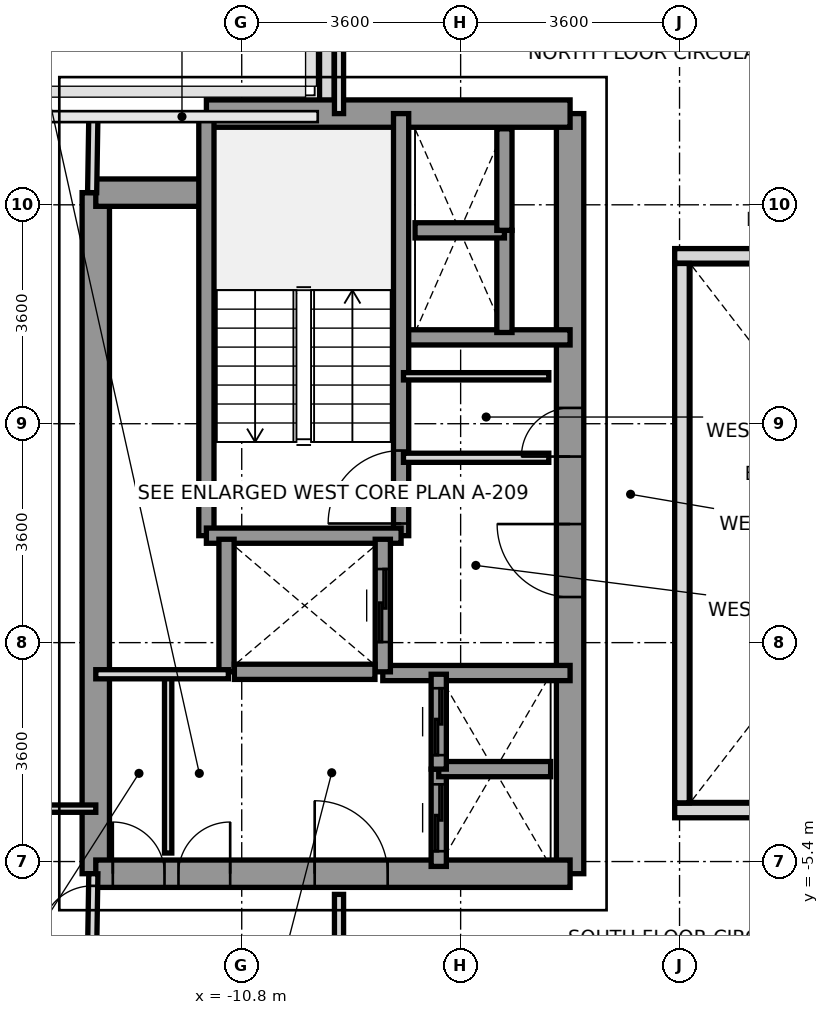
"""IFC4 building model, lengths in metres.
Left out: names, types, materials, properties, quantities, classifications, styles, units other than length and angle.
Written with IfcOpenShell. Run it as: python <this file> out.ifc"""

import sys

from ifc_helpers import new_model, si_unit, direction, frame, frame_2d, origin, place, context, subcontext, project, spatial, rectangle, extrude, source, transform, mapped, element, fill, save


model = new_model("IFC4")
c1 = context("Model", 3, precision=1e-05, world=origin(), true_north=direction((0.0, 1.0)))
c2 = subcontext(c1, "Body", "Model", "MODEL_VIEW")
j1 = project(units=[si_unit("LENGTHUNIT", "METRE"), si_unit("PLANEANGLEUNIT", "RADIAN")], contexts=[c1])
p1 = place(None, origin())
s1 = spatial("IfcSite", under=j1, at=p1, CompositionType="ELEMENT")
p2 = place(p1, origin())
s2 = spatial("IfcBuilding", under=s1, at=p2, CompositionType="ELEMENT")
p3 = place(p2, frame((0.0, 0.0, 121.0)))
s3 = spatial("IfcBuildingStorey", under=s2, at=p3, CompositionType="ELEMENT", Elevation=121.0)
p4 = place(p3, frame((-9.4, 6.953, 0.0), z_axis=(0.0, 0.0, 1.0), x_axis=(0.0, 1.0, 0.0)))
e1 = element("IfcWall", 1, at=p4, inside=s3, PredefinedType="PARAPET", context=c2, shape_type="SweptSolid", body=[
    extrude(rectangle(XDim=1.519, YDim=0.24, at=frame_2d((0.76, 0.0))), origin(), (0.0, 0.0, 1.0), 1.15),
])
p5 = place(p3, frame((-13.2, -5.6, 0.0), z_axis=(0.0, 0.0, 1.0), x_axis=(0.0, 1.0, 0.0)))
e2 = element("IfcWall", 2, at=p5, inside=s3, PredefinedType="SHEAR", context=c2, shape_type="SweptSolid", body=[
    extrude(rectangle(XDim=11.2, YDim=0.45, at=frame_2d((5.6, 0.0))), origin(), (0.0, 0.0, 1.0), 3.2),
])
p6 = place(p3, frame((-5.4, -5.6, 0.0), z_axis=(0.0, 0.0, 1.0), x_axis=(0.0, 1.0, 0.0)))
e3 = element("IfcWall", 3, at=p6, inside=s3, PredefinedType="SHEAR", context=c2, shape_type="SweptSolid", body=[
    extrude(rectangle(XDim=12.5, YDim=0.45, at=frame_2d((6.25, 0.0))), origin(), (0.0, 0.0, 1.0), 3.2),
])
p7 = place(p6, frame((4.55, 0.0, 0.0)))
e4 = element("IfcOpeningElement", 4, at=p7, cuts=e3, PredefinedType="OPENING", context=c2, shape_type="SweptSolid", body=[
    extrude(rectangle(XDim=1.2, YDim=2.2, at=frame_2d((0.6, 1.1))), frame((0.0, 0.235, 0.0), z_axis=(0.0, -1.0, 0.0), x_axis=(1.0, 0.0, 0.0)), (0.0, 0.0, 1.0), 0.47),
])
p8 = place(p6, frame((6.86, 0.0, 0.0)))
e5 = element("IfcOpeningElement", 5, at=p8, cuts=e3, PredefinedType="OPENING", context=c2, shape_type="SweptSolid", body=[
    extrude(rectangle(XDim=0.8, YDim=2.1, at=frame_2d((0.4, 1.05))), frame((0.0, 0.235, 0.0), z_axis=(0.0, -1.0, 0.0), x_axis=(1.0, 0.0, 0.0)), (0.0, 0.0, 1.0), 0.47),
])
p9 = place(p3, frame((-11.381, 6.9, 0.0), z_axis=(0.0, 0.0, 1.0), x_axis=(1.0, 0.0, 0.0)))
e6 = element("IfcWall", 6, at=p9, inside=s3, PredefinedType="SHEAR", context=c2, shape_type="SweptSolid", body=[
    extrude(rectangle(XDim=5.981, YDim=0.45, at=frame_2d((2.991, 0.0))), origin(), (0.0, 0.0, 1.0), 3.2),
])
p10 = place(p3, frame((-13.2, 5.6, 0.0), z_axis=(0.0, 0.0, 1.0), x_axis=(1.0, 0.0, 0.0)))
e7 = element("IfcWall", 7, at=p10, inside=s3, PredefinedType="SHEAR", context=c2, shape_type="SweptSolid", body=[
    extrude(rectangle(XDim=1.819, YDim=0.45, at=frame_2d((0.909, 0.0))), origin(), (0.0, 0.0, 1.0), 3.2),
])
p11 = place(p3, frame((-13.2, -5.6, 0.0), z_axis=(0.0, 0.0, 1.0), x_axis=(1.0, 0.0, 0.0)))
e8 = element("IfcWall", 8, at=p11, inside=s3, PredefinedType="SHEAR", context=c2, shape_type="SweptSolid", body=[
    extrude(rectangle(XDim=7.8, YDim=0.45, at=frame_2d((3.9, 0.0))), origin(), (0.0, 0.0, 1.0), 3.2),
])
p12 = place(p11, frame((3.6, 0.0, 0.0)))
e9 = element("IfcOpeningElement", 9, at=p12, cuts=e8, PredefinedType="OPENING", context=c2, shape_type="SweptSolid", body=[
    extrude(rectangle(XDim=1.2, YDim=2.2, at=frame_2d((0.6, 1.1))), frame((0.0, 0.235, 0.0), z_axis=(0.0, -1.0, 0.0), x_axis=(1.0, 0.0, 0.0)), (0.0, 0.0, 1.0), 0.47),
])
p13 = place(p11, frame((0.28, 0.0, 0.0)))
e10 = element("IfcOpeningElement", 10, at=p13, cuts=e8, PredefinedType="OPENING", context=c2, shape_type="SweptSolid", body=[
    extrude(rectangle(XDim=0.85, YDim=2.1, at=frame_2d((0.425, 1.05))), frame((0.0, 0.235, 0.0), z_axis=(0.0, -1.0, 0.0), x_axis=(1.0, 0.0, 0.0)), (0.0, 0.0, 1.0), 0.47),
])
p14 = place(p11, frame((1.36, 0.0, 0.0)))
e11 = element("IfcOpeningElement", 11, at=p14, cuts=e8, PredefinedType="OPENING", context=c2, shape_type="SweptSolid", body=[
    extrude(rectangle(XDim=0.85, YDim=2.1, at=frame_2d((0.425, 1.05))), frame((0.0, 0.235, 0.0), z_axis=(0.0, -1.0, 0.0), x_axis=(1.0, 0.0, 0.0)), (0.0, 0.0, 1.0), 0.47),
])
p15 = place(p3, frame((-8.18, 3.22, 0.0), z_axis=(0.0, 0.0, 1.0), x_axis=(1.0, 0.0, 0.0)))
e12 = element("IfcWall", 12, at=p15, inside=s3, PredefinedType="SOLIDWALL", context=c2, shape_type="SweptSolid", body=[
    extrude(rectangle(XDim=2.78, YDim=0.25, at=frame_2d((1.39, 0.0))), origin(), (0.0, 0.0, 1.0), 3.2),
])
p16 = place(p3, frame((-8.48, -2.3, 0.0), z_axis=(0.0, 0.0, 1.0), x_axis=(1.0, 0.0, 0.0)))
e13 = element("IfcWall", 13, at=p16, inside=s3, PredefinedType="SOLIDWALL", context=c2, shape_type="SweptSolid", body=[
    extrude(rectangle(XDim=3.08, YDim=0.25, at=frame_2d((1.54, 0.0))), origin(), (0.0, 0.0, 1.0), 3.2),
])
p17 = place(p3, frame((-8.179, -0.041, 0.0), z_axis=(0.0, 0.0, 1.0), x_axis=(0.0, 1.0, 0.0)))
e14 = element("IfcWall", 14, at=p17, inside=s3, PredefinedType="SOLIDWALL", context=c2, shape_type="SweptSolid", body=[
    extrude(rectangle(XDim=6.941, YDim=0.25, at=frame_2d((3.47, 0.0))), origin(), (0.0, 0.0, 1.0), 3.2),
])
p18 = place(p17, frame((0.2, 0.0, 0.0)))
e15 = element("IfcOpeningElement", 15, at=p18, cuts=e14, PredefinedType="OPENING", context=c2, shape_type="SweptSolid", body=[
    extrude(rectangle(XDim=1.2, YDim=2.2, at=frame_2d((0.6, 1.1))), frame((0.0, 0.135, 0.0), z_axis=(0.0, -1.0, 0.0), x_axis=(1.0, 0.0, 0.0)), (0.0, 0.0, 1.0), 0.27),
])
p19 = place(p3, frame((-11.381, -0.041, 0.0), z_axis=(0.0, 0.0, 1.0), x_axis=(0.0, 1.0, 0.0)))
e16 = element("IfcWall", 16, at=p19, inside=s3, PredefinedType="SOLIDWALL", context=c2, shape_type="SweptSolid", body=[
    extrude(rectangle(XDim=6.941, YDim=0.25, at=frame_2d((3.47, 0.0))), origin(), (0.0, 0.0, 1.0), 3.2),
])
p20 = place(p3, frame((-11.381, -0.041, 0.0), z_axis=(0.0, 0.0, 1.0), x_axis=(1.0, 0.0, 0.0)))
e17 = element("IfcWall", 17, at=p20, inside=s3, PredefinedType="SOLIDWALL", context=c2, shape_type="SweptSolid", body=[
    extrude(rectangle(XDim=3.202, YDim=0.25, at=frame_2d((1.601, 0.0))), origin(), (0.0, 0.0, 1.0), 3.2),
])
p21 = place(p3, frame((-11.05, -2.28, 0.0), z_axis=(0.0, 0.0, 1.0), x_axis=(0.0, 1.0, 0.0)))
e18 = element("IfcWall", 18, at=p21, inside=s3, PredefinedType="SOLIDWALL", context=c2, shape_type="SweptSolid", body=[
    extrude(rectangle(XDim=2.18, YDim=0.25, at=frame_2d((1.09, 0.0))), origin(), (0.0, 0.0, 1.0), 3.2),
])
p22 = place(p3, frame((-8.48, -2.28, 0.0), z_axis=(0.0, 0.0, 1.0), x_axis=(0.0, 1.0, 0.0)))
e19 = element("IfcWall", 19, at=p22, inside=s3, PredefinedType="SOLIDWALL", context=c2, shape_type="SweptSolid", body=[
    extrude(rectangle(XDim=2.18, YDim=0.25, at=frame_2d((1.09, 0.0))), origin(), (0.0, 0.0, 1.0), 3.2),
])
p23 = place(p22, frame((0.49, 0.0, 0.0)))
e20 = element("IfcOpeningElement", 20, at=p23, cuts=e19, PredefinedType="OPENING", context=c2, shape_type="SweptSolid", body=[
    extrude(rectangle(XDim=1.2, YDim=2.2, at=frame_2d((0.6, 1.1))), frame((0.0, 0.135, 0.0), z_axis=(0.0, -1.0, 0.0), x_axis=(1.0, 0.0, 0.0)), (0.0, 0.0, 1.0), 0.27),
])
p24 = place(p3, frame((-10.921, -2.28, 0.0), z_axis=(0.0, 0.0, 1.0), x_axis=(1.0, 0.0, 0.0)))
e21 = element("IfcWall", 21, at=p24, inside=s3, PredefinedType="SOLIDWALL", context=c2, shape_type="SweptSolid", body=[
    extrude(rectangle(XDim=2.312, YDim=0.25, at=frame_2d((1.156, 0.0))), origin(), (0.0, 0.0, 1.0), 3.2),
])
p25 = place(p3, frame((-7.56, -5.48, 0.0), z_axis=(0.0, 0.0, 1.0), x_axis=(0.0, 1.0, 0.0)))
e22 = element("IfcWall", 22, at=p25, inside=s3, PredefinedType="SOLIDWALL", context=c2, shape_type="SweptSolid", body=[
    extrude(rectangle(XDim=1.6, YDim=0.25, at=frame_2d((0.8, 0.0))), origin(), (0.0, 0.0, 1.0), 3.2),
])
p26 = place(p25, frame((0.25, 0.0, 0.0)))
e23 = element("IfcOpeningElement", 23, at=p26, cuts=e22, PredefinedType="OPENING", context=c2, shape_type="SweptSolid", body=[
    extrude(rectangle(XDim=1.1, YDim=2.2, at=frame_2d((0.55, 1.1))), frame((0.0, 0.135, 0.0), z_axis=(0.0, -1.0, 0.0), x_axis=(1.0, 0.0, 0.0)), (0.0, 0.0, 1.0), 0.27),
])
p27 = place(p3, frame((-7.56, -3.88, 0.0), z_axis=(0.0, 0.0, 1.0), x_axis=(1.0, 0.0, 0.0)))
e24 = element("IfcWall", 24, at=p27, inside=s3, PredefinedType="SOLIDWALL", context=c2, shape_type="SweptSolid", body=[
    extrude(rectangle(XDim=1.84, YDim=0.25, at=frame_2d((0.92, 0.0))), origin(), (0.0, 0.0, 1.0), 3.2),
])
p28 = place(p3, frame((-7.56, -3.88, 0.0), z_axis=(0.0, 0.0, 1.0), x_axis=(0.0, 1.0, 0.0)))
e25 = element("IfcWall", 25, at=p28, inside=s3, PredefinedType="SOLIDWALL", context=c2, shape_type="SweptSolid", body=[
    extrude(rectangle(XDim=1.56, YDim=0.25, at=frame_2d((0.78, 0.0))), origin(), (0.0, 0.0, 1.0), 3.2),
])
p29 = place(p28, frame((0.23, 0.0, 0.0)))
e26 = element("IfcOpeningElement", 26, at=p29, cuts=e25, PredefinedType="OPENING", context=c2, shape_type="SweptSolid", body=[
    extrude(rectangle(XDim=1.1, YDim=2.2, at=frame_2d((0.55, 1.1))), frame((0.0, 0.135, 0.0), z_axis=(0.0, -1.0, 0.0), x_axis=(1.0, 0.0, 0.0)), (0.0, 0.0, 1.0), 0.27),
])
p30 = place(p3, frame((-6.48, 3.3, 0.0), z_axis=(0.0, 0.0, 1.0), x_axis=(0.0, 1.0, 0.0)))
e27 = element("IfcWall", 27, at=p30, inside=s3, PredefinedType="SOLIDWALL", context=c2, shape_type="SweptSolid", body=[
    extrude(rectangle(XDim=1.68, YDim=0.25, at=frame_2d((0.84, 0.0))), origin(), (0.0, 0.0, 1.0), 3.2),
])
p31 = place(p3, frame((-7.95, 4.98, 0.0), z_axis=(0.0, 0.0, 1.0), x_axis=(1.0, 0.0, 0.0)))
e28 = element("IfcWall", 28, at=p31, inside=s3, PredefinedType="SOLIDWALL", context=c2, shape_type="SweptSolid", body=[
    extrude(rectangle(XDim=1.47, YDim=0.25, at=frame_2d((0.735, 0.0))), origin(), (0.0, 0.0, 1.0), 3.2),
])
p32 = place(p3, frame((-6.48, 4.98, 0.0), z_axis=(0.0, 0.0, 1.0), x_axis=(0.0, 1.0, 0.0)))
e29 = element("IfcWall", 29, at=p32, inside=s3, PredefinedType="SOLIDWALL", context=c2, shape_type="SweptSolid", body=[
    extrude(rectangle(XDim=1.67, YDim=0.25, at=frame_2d((0.835, 0.0))), origin(), (0.0, 0.0, 1.0), 3.2),
])
p33 = place(p3, frame((-8.14, 1.24, 0.0), z_axis=(0.0, 0.0, 1.0), x_axis=(1.0, 0.0, 0.0)))
e30 = element("IfcWall", 30, at=p33, inside=s3, PredefinedType="PARTITIONING", context=c2, shape_type="SweptSolid", body=[
    extrude(rectangle(XDim=2.39, YDim=0.15, at=frame_2d((1.195, 0.0))), origin(), (0.0, 0.0, 1.0), 2.3),
])
p34 = place(p3, frame((-8.14, 2.58, 0.0), z_axis=(0.0, 0.0, 1.0), x_axis=(1.0, 0.0, 0.0)))
e31 = element("IfcWall", 31, at=p34, inside=s3, PredefinedType="PARTITIONING", context=c2, shape_type="SweptSolid", body=[
    extrude(rectangle(XDim=2.39, YDim=0.12, at=frame_2d((1.195, 0.0))), origin(), (0.0, 0.0, 1.0), 2.3),
])
p35 = place(p3, frame((-12.01, -5.26, 0.0), z_axis=(0.0, 0.0, 1.0), x_axis=(0.0, 1.0, 0.0)))
e32 = element("IfcWall", 32, at=p35, inside=s3, PredefinedType="PARTITIONING", context=c2, shape_type="SweptSolid", body=[
    extrude(rectangle(XDim=2.94, YDim=0.12, at=frame_2d((1.47, 0.0))), origin(), (0.0, 0.0, 1.0), 3.2),
])
p36 = place(p3, frame((-13.2, -2.32, 0.0), z_axis=(0.0, 0.0, 1.0), x_axis=(1.0, 0.0, 0.0)))
e33 = element("IfcWall", 33, at=p36, inside=s3, PredefinedType="PARTITIONING", context=c2, shape_type="SweptSolid", body=[
    extrude(rectangle(XDim=2.18, YDim=0.15, at=frame_2d((1.09, 0.0))), origin(), (0.0, 0.0, 1.0), 3.2),
])
p37 = place(p3, frame((-9.2, 6.9, 0.0), z_axis=(0.0, 0.0, 1.0), x_axis=(0.0, 1.0, 0.0)))
e34 = element("IfcWall", 34, at=p37, inside=s3, PredefinedType="PARTITIONING", context=c2, shape_type="SweptSolid", body=[
    extrude(rectangle(XDim=8.78, YDim=0.15, at=frame_2d((4.39, 0.0))), origin(), (0.0, 0.0, 1.0), 2.7),
])
p38 = place(p3, frame((-9.2, -15.68, 0.0), z_axis=(0.0, 0.0, 1.0), x_axis=(0.0, 1.0, 0.0)))
e35 = element("IfcWall", 35, at=p38, inside=s3, PredefinedType="PARTITIONING", context=c2, shape_type="SweptSolid", body=[
    extrude(rectangle(XDim=9.74, YDim=0.15, at=frame_2d((4.87, 0.0))), origin(), (0.0, 0.0, 1.0), 2.7),
])
p39 = place(p3, frame((-13.26, 5.6, 0.0), z_axis=(0.0, 0.0, 1.0), x_axis=(0.016013571389, 0.999871774545, 0.0)))
e36 = element("IfcWall", 36, at=p39, inside=s3, PredefinedType="PARTITIONING", context=c2, shape_type="SweptSolid", body=[
    extrude(rectangle(XDim=1.25, YDim=0.15, at=frame_2d((0.625, 0.0))), origin(), (0.0, 0.0, 1.0), 3.2),
])
p40 = place(p3, frame((-13.26, -6.85, 0.0), z_axis=(0.0, 0.0, 1.0), x_axis=(0.016013571389, 0.999871774545, 0.0)))
e37 = element("IfcWall", 37, at=p40, inside=s3, PredefinedType="PARTITIONING", context=c2, shape_type="SweptSolid", body=[
    extrude(rectangle(XDim=1.25, YDim=0.15, at=frame_2d((0.625, 0.0))), origin(), (0.0, 0.0, 1.0), 3.2),
])
p41 = place(p40, frame((0.2, 0.0, 0.0)))
e38 = element("IfcOpeningElement", 38, at=p41, cuts=e37, PredefinedType="OPENING", context=c2, shape_type="SweptSolid", body=[
    extrude(rectangle(XDim=0.85, YDim=2.1, at=frame_2d((0.425, 1.05))), frame((0.0, 0.085, 0.0), z_axis=(0.0, -1.0, 0.0), x_axis=(1.0, 0.0, 0.0)), (0.0, 0.0, 1.0), 0.17),
])
p42 = place(p3, frame((-23.3, -4.53, 0.0), z_axis=(0.0, 0.0, 1.0), x_axis=(1.0, 0.0, 0.0)))
e39 = element("IfcWall", 39, at=p42, inside=s3, PredefinedType="PARTITIONING", context=c2, shape_type="SweptSolid", body=[
    extrude(rectangle(XDim=10.1, YDim=0.12, at=frame_2d((5.05, 0.0))), origin(), (0.0, 0.0, 1.0), 2.75),
])
p43 = place(p42, frame((1.4, 0.0, 0.0)))
e40 = element("IfcOpeningElement", 40, at=p43, cuts=e39, PredefinedType="OPENING", context=c2, shape_type="SweptSolid", body=[
    extrude(rectangle(XDim=0.95, YDim=2.15, at=frame_2d((0.475, 1.075))), frame((0.0, 0.07, 0.0), z_axis=(0.0, -1.0, 0.0), x_axis=(1.0, 0.0, 0.0)), (0.0, 0.0, 1.0), 0.14),
])
for number, where, z_axis, x_axis in (
    (41, (-3.68, -4.56, 0.0), (0.0, 0.0, 1.0), (1.0, 0.0, 0.0)),
    (42, (-3.68, 4.56, 0.0), (0.0, 0.0, 1.0), (1.0, 0.0, 0.0)),
):
    element("IfcWall", number, at=place(p3, frame(where, z_axis=z_axis, x_axis=x_axis)), inside=s3, PredefinedType="PARAPET", context=c2, shape_type="SweptSolid", body=[
        extrude(rectangle(XDim=7.36, YDim=0.24, at=frame_2d((3.68, 0.0))), origin(), (0.0, 0.0, 1.0), 1.15),
    ])
p44 = place(p3, frame((-3.56, -4.435, 0.0), z_axis=(0.0, 0.0, 1.0), x_axis=(0.0, 1.0, 0.0)))
e43 = element("IfcWall", 43, at=p44, inside=s3, PredefinedType="PARAPET", context=c2, shape_type="SweptSolid", body=[
    extrude(rectangle(XDim=8.87, YDim=0.24, at=frame_2d((4.435, 0.0))), origin(), (0.0, 0.0, 1.0), 1.15),
])
m1 = source(origin(), c2, "Body", "SweptSolid", [
    extrude(rectangle(XDim=1.2, YDim=2.2, at=frame_2d((0.6, 1.1))), frame((0.0, 0.025, 0.0), z_axis=(0.0, -1.0, 0.0), x_axis=(1.0, 0.0, 0.0)), (0.0, 0.0, 1.0), 0.05),
])
p45 = place(p18, origin())
e44 = element("IfcDoor", 44, at=p45, inside=s3, OperationType="SINGLE_SWING_LEFT", PredefinedType="DOOR", context=c2, shape_type="MappedRepresentation", body=[
    mapped(m1, transform((0.0, 0.0, 0.0), x_axis=(1.0, 0.0, 0.0), y_axis=(0.0, 1.0, 0.0), z_axis=(0.0, 0.0, 1.0), scale=1.0)),
])
fill(e15, e44)
p46 = place(p7, origin())
e45 = element("IfcDoor", 45, at=p46, inside=s3, OperationType="SINGLE_SWING_RIGHT", PredefinedType="DOOR", context=c2, shape_type="MappedRepresentation", body=[
    mapped(m1, transform((0.0, 0.0, 0.0), x_axis=(1.0, 0.0, 0.0), y_axis=(0.0, 1.0, 0.0), z_axis=(0.0, 0.0, 1.0), scale=1.0)),
])
fill(e4, e45)
p47 = place(p12, origin())
e46 = element("IfcDoor", 46, at=p47, inside=s3, OperationType="SINGLE_SWING_LEFT", PredefinedType="DOOR", context=c2, shape_type="MappedRepresentation", body=[
    mapped(m1, transform((0.0, 0.0, 0.0), x_axis=(1.0, 0.0, 0.0), y_axis=(0.0, 1.0, 0.0), z_axis=(0.0, 0.0, 1.0), scale=1.0)),
])
fill(e9, e46)
m2 = source(origin(), c2, "Body", "SweptSolid", [
    extrude(rectangle(XDim=0.8, YDim=2.1, at=frame_2d((0.4, 1.05))), frame((0.0, 0.025, 0.0), z_axis=(0.0, -1.0, 0.0), x_axis=(1.0, 0.0, 0.0)), (0.0, 0.0, 1.0), 0.05),
])
p48 = place(p8, origin())
e47 = element("IfcDoor", 47, at=p48, inside=s3, OperationType="SINGLE_SWING_LEFT", PredefinedType="DOOR", context=c2, shape_type="MappedRepresentation", body=[
    mapped(m2, transform((0.0, 0.0, 0.0), x_axis=(1.0, 0.0, 0.0), y_axis=(0.0, 1.0, 0.0), z_axis=(0.0, 0.0, 1.0), scale=1.0)),
])
fill(e5, e47)
m3 = source(origin(), c2, "Body", "SweptSolid", [
    extrude(rectangle(XDim=0.85, YDim=2.1, at=frame_2d((0.425, 1.05))), frame((0.0, 0.025, 0.0), z_axis=(0.0, -1.0, 0.0), x_axis=(1.0, 0.0, 0.0)), (0.0, 0.0, 1.0), 0.05),
])
p49 = place(p13, origin())
e48 = element("IfcDoor", 48, at=p49, inside=s3, OperationType="SINGLE_SWING_LEFT", PredefinedType="DOOR", context=c2, shape_type="MappedRepresentation", body=[
    mapped(m3, transform((0.0, 0.0, 0.0), x_axis=(1.0, 0.0, 0.0), y_axis=(0.0, 1.0, 0.0), z_axis=(0.0, 0.0, 1.0), scale=1.0)),
])
fill(e10, e48)
p50 = place(p14, origin())
e49 = element("IfcDoor", 49, at=p50, inside=s3, OperationType="SINGLE_SWING_RIGHT", PredefinedType="DOOR", context=c2, shape_type="MappedRepresentation", body=[
    mapped(m3, transform((0.0, 0.0, 0.0), x_axis=(1.0, 0.0, 0.0), y_axis=(0.0, 1.0, 0.0), z_axis=(0.0, 0.0, 1.0), scale=1.0)),
])
fill(e11, e49)
p51 = place(p23, origin())
e50 = element("IfcDoor", 50, at=p51, inside=s3, OperationType="SLIDING_TO_RIGHT", PredefinedType="DOOR", context=c2, shape_type="MappedRepresentation", body=[
    mapped(m1, transform((0.0, 0.0, 0.0), x_axis=(1.0, 0.0, 0.0), y_axis=(0.0, 1.0, 0.0), z_axis=(0.0, 0.0, 1.0), scale=1.0)),
])
fill(e20, e50)
m4 = source(origin(), c2, "Body", "SweptSolid", [
    extrude(rectangle(XDim=1.1, YDim=2.2, at=frame_2d((0.55, 1.1))), frame((0.0, 0.025, 0.0), z_axis=(0.0, -1.0, 0.0), x_axis=(1.0, 0.0, 0.0)), (0.0, 0.0, 1.0), 0.05),
])
p52 = place(p26, origin())
e51 = element("IfcDoor", 51, at=p52, inside=s3, OperationType="SLIDING_TO_LEFT", PredefinedType="DOOR", context=c2, shape_type="MappedRepresentation", body=[
    mapped(m4, transform((0.0, 0.0, 0.0), x_axis=(1.0, 0.0, 0.0), y_axis=(0.0, 1.0, 0.0), z_axis=(0.0, 0.0, 1.0), scale=1.0)),
])
fill(e23, e51)
p53 = place(p29, origin())
e52 = element("IfcDoor", 52, at=p53, inside=s3, OperationType="SLIDING_TO_LEFT", PredefinedType="DOOR", context=c2, shape_type="MappedRepresentation", body=[
    mapped(m4, transform((0.0, 0.0, 0.0), x_axis=(1.0, 0.0, 0.0), y_axis=(0.0, 1.0, 0.0), z_axis=(0.0, 0.0, 1.0), scale=1.0)),
])
fill(e26, e52)
p54 = place(p41, origin())
e53 = element("IfcDoor", 53, at=p54, inside=s3, OperationType="SINGLE_SWING_LEFT", PredefinedType="DOOR", context=c2, shape_type="MappedRepresentation", body=[
    mapped(m3, transform((0.0, 0.0, 0.0), x_axis=(1.0, 0.0, 0.0), y_axis=(0.0, 1.0, 0.0), z_axis=(0.0, 0.0, 1.0), scale=1.0)),
])
fill(e38, e53)
save(model, sys.argv[1])
